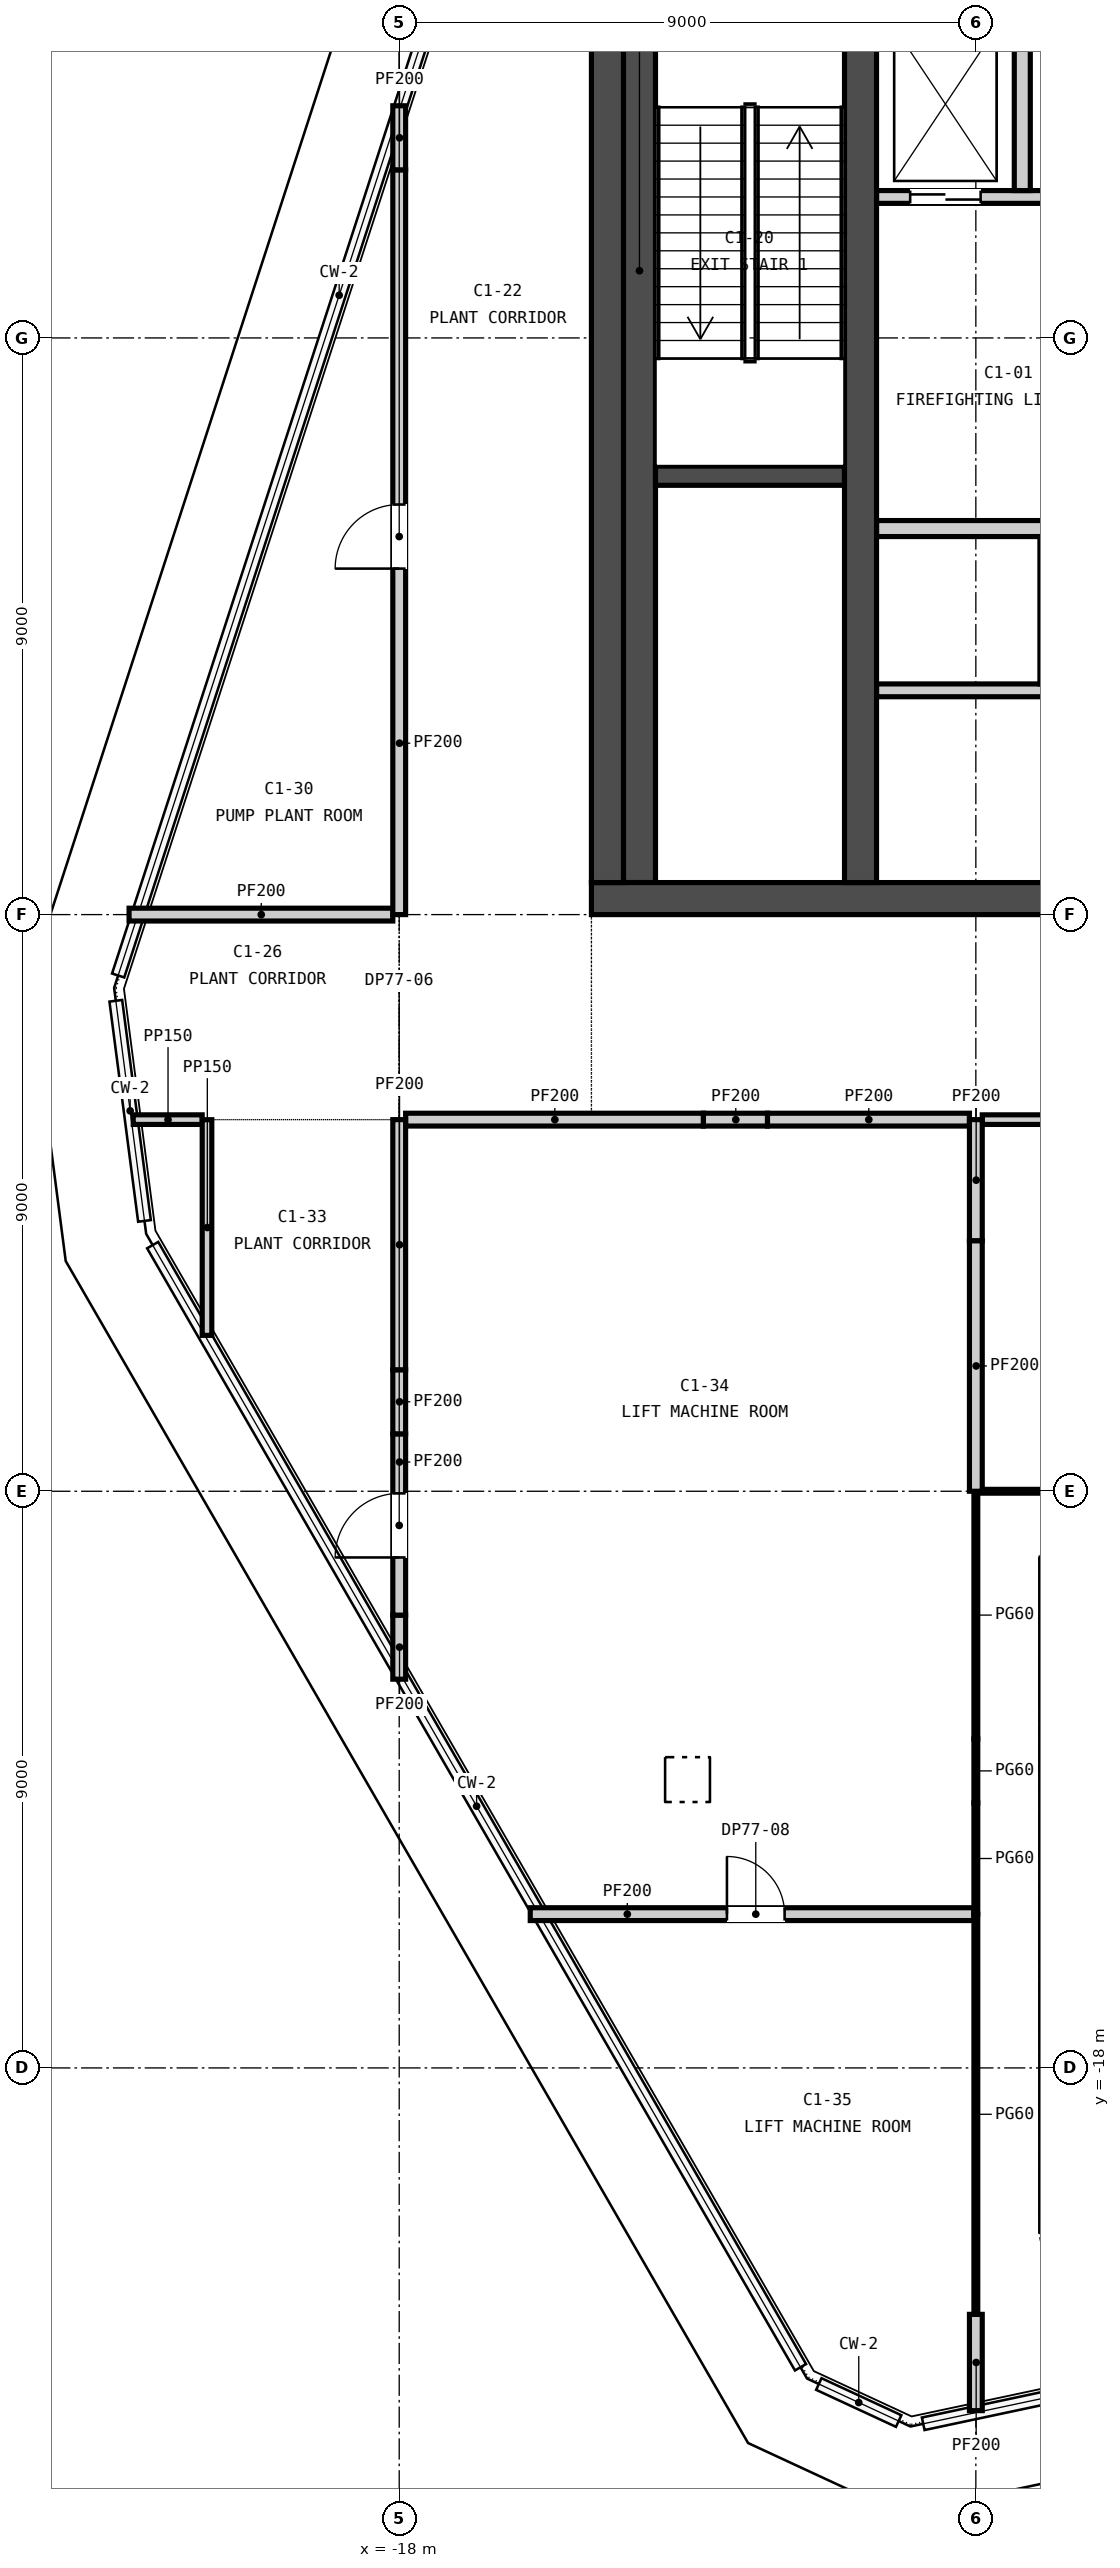
"""IFC4 building model, lengths in metres.
Left out: names, types, materials, properties, quantities, classifications, styles, units other than length and angle.
Written with IfcOpenShell. Run it as: python <this file> out.ifc"""

import sys

from ifc_helpers import new_model, si_unit, direction, frame, frame_2d, origin, place, context, subcontext, project, spatial, rectangle, extrude, element, fill, save


model = new_model("IFC4")
c1 = context("Model", 3, precision=1e-05, world=origin(), true_north=direction((0.0, 1.0)))
c2 = subcontext(c1, "Body", "Model", "MODEL_VIEW")
j1 = project(units=[si_unit("LENGTHUNIT", "METRE"), si_unit("PLANEANGLEUNIT", "RADIAN")], contexts=[c1])
p1 = place(None, origin())
s1 = spatial("IfcSite", under=j1, at=p1, CompositionType="ELEMENT")
p2 = place(p1, origin())
s2 = spatial("IfcBuilding", under=s1, at=p2, CompositionType="ELEMENT")
p3 = place(p2, frame((0.0, 0.0, 301.1)))
s3 = spatial("IfcBuildingStorey", under=s2, at=p3, CompositionType="ELEMENT", Elevation=301.1)
p4 = place(p3, frame((-15.0, 0.25, -0.25), z_axis=(0.0, 0.0, 1.0), x_axis=(1.0, 0.0, 0.0)))
e1 = element("IfcWall", 1, at=p4, inside=s3, PredefinedType="SOLIDWALL", context=c2, shape_type="SweptSolid", body=[
    extrude(rectangle(XDim=30.0, YDim=0.5, at=frame_2d((15.0, 0.0))), origin(), (0.0, 0.0, 1.0), 5.0),
])
for number, where, z_axis, x_axis in (
    (2, (-14.75, 0.5, -0.25), (0.0, 0.0, 1.0), (0.0, 1.0, 0.0)),
    (3, (-10.8, 0.5, -0.25), (0.0, 0.0, 1.0), (0.0, 1.0, 0.0)),
):
    element("IfcWall", number, at=place(p3, frame(where, z_axis=z_axis, x_axis=x_axis)), inside=s3, PredefinedType="SOLIDWALL", context=c2, shape_type="SweptSolid", body=[
        extrude(rectangle(XDim=14.0, YDim=0.5, at=frame_2d((7.0, 0.0))), origin(), (0.0, 0.0, 1.0), 5.0),
    ])
p5 = place(p3, frame((-10.55, 3.5, 0.0), z_axis=(0.0, 0.0, 1.0), x_axis=(1.0, 0.0, 0.0)))
e4 = element("IfcWall", 4, at=p5, inside=s3, PredefinedType="PARTITIONING", context=c2, shape_type="SweptSolid", body=[
    extrude(rectangle(XDim=21.1, YDim=0.2, at=frame_2d((10.55, 0.0))), origin(), (0.0, 0.0, 1.0), 4.75),
])
p6 = place(p5, frame((19.9, 0.0, 0.0)))
e5 = element("IfcOpeningElement", 5, at=p6, cuts=e4, PredefinedType="OPENING", context=c2, shape_type="SweptSolid", body=[
    extrude(rectangle(XDim=0.9, YDim=2.1, at=frame_2d((0.45, 1.05))), frame((0.0, 0.11, 0.0), z_axis=(0.0, -1.0, 0.0), x_axis=(1.0, 0.0, 0.0)), (0.0, 0.0, 1.0), 0.22),
])
p7 = place(p3, frame((-10.55, 6.025, 0.0), z_axis=(0.0, 0.0, 1.0), x_axis=(1.0, 0.0, 0.0)))
e6 = element("IfcWall", 6, at=p7, inside=s3, PredefinedType="PARTITIONING", context=c2, shape_type="SweptSolid", body=[
    extrude(rectangle(XDim=21.1, YDim=0.25, at=frame_2d((10.55, 0.0))), origin(), (0.0, 0.0, 1.0), 4.75),
])
p8 = place(p3, frame((-10.55, 11.2, 0.0), z_axis=(0.0, 0.0, 1.0), x_axis=(1.0, 0.0, 0.0)))
e7 = element("IfcWall", 7, at=p8, inside=s3, PredefinedType="PARTITIONING", context=c2, shape_type="SweptSolid", body=[
    extrude(rectangle(XDim=4.8, YDim=0.2, at=frame_2d((2.4, 0.0))), origin(), (0.0, 0.0, 1.0), 4.75),
])
p9 = place(p8, frame((0.525, 0.0, 0.0)))
e8 = element("IfcOpeningElement", 8, at=p9, cuts=e7, PredefinedType="OPENING", context=c2, shape_type="SweptSolid", body=[
    extrude(rectangle(XDim=1.1, YDim=2.1, at=frame_2d((0.55, 1.05))), frame((0.0, 0.11, 0.0), z_axis=(0.0, -1.0, 0.0), x_axis=(1.0, 0.0, 0.0)), (0.0, 0.0, 1.0), 0.22),
])
p10 = place(p8, frame((2.925, 0.0, 0.0)))
e9 = element("IfcOpeningElement", 9, at=p10, cuts=e7, PredefinedType="OPENING", context=c2, shape_type="SweptSolid", body=[
    extrude(rectangle(XDim=1.1, YDim=2.1, at=frame_2d((0.55, 1.05))), frame((0.0, 0.11, 0.0), z_axis=(0.0, -1.0, 0.0), x_axis=(1.0, 0.0, 0.0)), (0.0, 0.0, 1.0), 0.22),
])
p11 = place(p3, frame((-8.275, 11.3, 0.0), z_axis=(0.0, 0.0, 1.0), x_axis=(0.0, 1.0, 0.0)))
e10 = element("IfcWall", 10, at=p11, inside=s3, PredefinedType="PARTITIONING", context=c2, shape_type="SweptSolid", body=[
    extrude(rectangle(XDim=3.2, YDim=0.25, at=frame_2d((1.6, 0.0))), origin(), (0.0, 0.0, 1.0), 4.75),
])
p12 = place(p3, frame((-14.0, 6.85, 0.0), z_axis=(0.0, 0.0, 1.0), x_axis=(1.0, 0.0, 0.0)))
e11 = element("IfcWall", 11, at=p12, inside=s3, PredefinedType="SOLIDWALL", context=c2, shape_type="SweptSolid", body=[
    extrude(rectangle(XDim=2.95, YDim=0.3, at=frame_2d((1.475, 0.0))), origin(), (0.0, 0.0, 1.0), 4.75),
])
p13 = place(p3, frame((-14.25, 0.5, 0.0), z_axis=(0.0, 0.0, 1.0), x_axis=(0.0, 1.0, 0.0)))
e12 = element("IfcWall", 12, at=p13, inside=s3, PredefinedType="SOLIDWALL", context=c2, shape_type="SweptSolid", body=[
    extrude(rectangle(XDim=14.0, YDim=0.5, at=frame_2d((7.0, 0.0))), origin(), (0.0, 0.0, 1.0), 4.75),
])
p14 = place(p3, frame((-15.955, -15.6, 0.0), z_axis=(0.0, 0.0, 1.0), x_axis=(1.0, 0.0, 0.0)))
e13 = element("IfcWall", 13, at=p14, inside=s3, PredefinedType="PARTITIONING", context=c2, shape_type="SweptSolid", body=[
    extrude(rectangle(XDim=6.925, YDim=0.2, at=frame_2d((3.462, 0.0))), origin(), (0.0, 0.0, 1.0), 4.75),
])
p15 = place(p14, frame((3.07, 0.0, 0.0)))
e14 = element("IfcOpeningElement", 14, at=p15, cuts=e13, PredefinedType="OPENING", context=c2, shape_type="SweptSolid", body=[
    extrude(rectangle(XDim=0.9, YDim=2.1, at=frame_2d((0.45, 1.05))), frame((0.0, 0.11, 0.0), z_axis=(0.0, -1.0, 0.0), x_axis=(1.0, 0.0, 0.0)), (0.0, 0.0, 1.0), 0.22),
])
p16 = place(p3, frame((-8.9, -9.0, 0.0), z_axis=(0.0, 0.0, 1.0), x_axis=(1.0, 0.0, 0.0)))
e15 = element("IfcWall", 15, at=p16, inside=s3, PredefinedType="PARTITIONING", context=c2, shape_type="SweptSolid", body=[
    extrude(rectangle(XDim=17.825, YDim=0.06, at=frame_2d((8.913, 0.0))), origin(), (0.0, 0.0, 1.0), 4.75),
])
p17 = place(p3, frame((-22.151, -3.2, 0.0), z_axis=(0.0, 0.0, 1.0), x_axis=(1.0, 0.0, 0.0)))
e16 = element("IfcWall", 16, at=p17, inside=s3, PredefinedType="PARTITIONING", context=c2, shape_type="SweptSolid", body=[
    extrude(rectangle(XDim=1.076, YDim=0.15, at=frame_2d((0.538, 0.0))), origin(), (0.0, 0.0, 1.0), 4.15),
])
p18 = place(p3, frame((-17.9, -3.2, 0.0), z_axis=(0.0, 0.0, 1.0), x_axis=(1.0, 0.0, 0.0)))
e17 = element("IfcWall", 17, at=p18, inside=s3, PredefinedType="PARTITIONING", context=c2, shape_type="SweptSolid", body=[
    extrude(rectangle(XDim=4.648, YDim=0.2, at=frame_2d((2.324, 0.0))), origin(), (0.0, 0.0, 1.0), 4.75),
])
p19 = place(p3, frame((-13.252, -3.2, 0.0), z_axis=(0.0, 0.0, 1.0), x_axis=(1.0, 0.0, 0.0)))
e18 = element("IfcWall", 18, at=p19, inside=s3, PredefinedType="PARTITIONING", context=c2, shape_type="SweptSolid", body=[
    extrude(rectangle(XDim=1.0, YDim=0.2, at=frame_2d((0.5, 0.0))), origin(), (0.0, 0.0, 1.0), 4.0),
])
p20 = place(p3, frame((-12.252, -3.2, 0.0), z_axis=(0.0, 0.0, 1.0), x_axis=(1.0, 0.0, 0.0)))
e19 = element("IfcWall", 19, at=p20, inside=s3, PredefinedType="PARTITIONING", context=c2, shape_type="SweptSolid", body=[
    extrude(rectangle(XDim=3.152, YDim=0.2, at=frame_2d((1.576, 0.0))), origin(), (0.0, 0.0, 1.0), 4.75),
])
p21 = place(p3, frame((-8.9, -3.2, 0.0), z_axis=(0.0, 0.0, 1.0), x_axis=(1.0, 0.0, 0.0)))
e20 = element("IfcWall", 20, at=p21, inside=s3, PredefinedType="PARTITIONING", context=c2, shape_type="SweptSolid", body=[
    extrude(rectangle(XDim=26.825, YDim=0.15, at=frame_2d((13.413, 0.0))), origin(), (0.0, 0.0, 1.0), 4.75),
])
p22 = place(p21, frame((8.4, 0.0, 0.0)))
e21 = element("IfcOpeningElement", 21, at=p22, cuts=e20, PredefinedType="OPENING", context=c2, shape_type="SweptSolid", body=[
    extrude(rectangle(XDim=1.0, YDim=2.1, at=frame_2d((0.5, 1.05))), frame((0.0, 0.085, 0.0), z_axis=(0.0, -1.0, 0.0), x_axis=(1.0, 0.0, 0.0)), (0.0, 0.0, 1.0), 0.17),
])
p23 = place(p3, frame((-22.216, 0.0, 0.0), z_axis=(0.0, 0.0, 1.0), x_axis=(1.0, 0.0, 0.0)))
e22 = element("IfcWall", 22, at=p23, inside=s3, PredefinedType="PARTITIONING", context=c2, shape_type="SweptSolid", body=[
    extrude(rectangle(XDim=4.116, YDim=0.2, at=frame_2d((2.058, 0.0))), origin(), (0.0, 0.0, 1.0), 4.75),
])
p24 = place(p3, frame((-21.0, -6.567, 0.0), z_axis=(0.0, 0.0, 1.0), x_axis=(0.0, 1.0, 0.0)))
e23 = element("IfcWall", 23, at=p24, inside=s3, PredefinedType="PARTITIONING", context=c2, shape_type="SweptSolid", body=[
    extrude(rectangle(XDim=3.366, YDim=0.15, at=frame_2d((1.683, 0.0))), origin(), (0.0, 0.0, 1.0), 4.75),
])
p25 = place(p3, frame((-18.0, -11.933, 0.0), z_axis=(0.0, 0.0, 1.0), x_axis=(0.0, 1.0, 0.0)))
e24 = element("IfcWall", 24, at=p25, inside=s3, PredefinedType="PARTITIONING", context=c2, shape_type="SweptSolid", body=[
    extrude(rectangle(XDim=1.0, YDim=0.2, at=frame_2d((0.5, 0.0))), origin(), (0.0, 0.0, 1.0), 4.134),
])
p26 = place(p3, frame((-18.0, -10.933, 0.0), z_axis=(0.0, 0.0, 1.0), x_axis=(0.0, 1.0, 0.0)))
e25 = element("IfcWall", 25, at=p26, inside=s3, PredefinedType="PARTITIONING", context=c2, shape_type="SweptSolid", body=[
    extrude(rectangle(XDim=2.829, YDim=0.2, at=frame_2d((1.415, 0.0))), origin(), (0.0, 0.0, 1.0), 4.75),
])
p27 = place(p26, frame((0.9, 0.0, 0.0)))
e26 = element("IfcOpeningElement", 26, at=p27, cuts=e25, PredefinedType="OPENING", context=c2, shape_type="SweptSolid", body=[
    extrude(rectangle(XDim=1.0, YDim=2.1, at=frame_2d((0.5, 1.05))), frame((0.0, 0.11, 0.0), z_axis=(0.0, -1.0, 0.0), x_axis=(1.0, 0.0, 0.0)), (0.0, 0.0, 1.0), 0.22),
])
p28 = place(p3, frame((-18.0, -8.104, 0.0), z_axis=(0.0, 0.0, 1.0), x_axis=(0.0, 1.0, 0.0)))
e27 = element("IfcWall", 27, at=p28, inside=s3, PredefinedType="PARTITIONING", context=c2, shape_type="SweptSolid", body=[
    extrude(rectangle(XDim=1.0, YDim=0.2, at=frame_2d((0.5, 0.0))), origin(), (0.0, 0.0, 1.0), 4.0),
])
p29 = place(p3, frame((-18.0, -7.104, 0.0), z_axis=(0.0, 0.0, 1.0), x_axis=(0.0, 1.0, 0.0)))
e28 = element("IfcWall", 28, at=p29, inside=s3, PredefinedType="PARTITIONING", context=c2, shape_type="SweptSolid", body=[
    extrude(rectangle(XDim=3.904, YDim=0.2, at=frame_2d((1.952, 0.0))), origin(), (0.0, 0.0, 1.0), 4.75),
])
p30 = place(p3, frame((-18.0, 0.0, 0.0), z_axis=(0.0, 0.0, 1.0), x_axis=(0.0, 1.0, 0.0)))
e29 = element("IfcWall", 29, at=p30, inside=s3, PredefinedType="PARTITIONING", context=c2, shape_type="SweptSolid", body=[
    extrude(rectangle(XDim=11.624, YDim=0.2, at=frame_2d((5.812, 0.0))), origin(), (0.0, 0.0, 1.0), 4.75),
])
p31 = place(p30, frame((5.4, 0.0, 0.0)))
e30 = element("IfcOpeningElement", 30, at=p31, cuts=e29, PredefinedType="OPENING", context=c2, shape_type="SweptSolid", body=[
    extrude(rectangle(XDim=1.0, YDim=2.1, at=frame_2d((0.5, 1.05))), frame((0.0, 0.11, 0.0), z_axis=(0.0, -1.0, 0.0), x_axis=(1.0, 0.0, 0.0)), (0.0, 0.0, 1.0), 0.22),
])
p32 = place(p3, frame((-18.0, 11.624, 0.0), z_axis=(0.0, 0.0, 1.0), x_axis=(0.0, 1.0, 0.0)))
e31 = element("IfcWall", 31, at=p32, inside=s3, PredefinedType="PARTITIONING", context=c2, shape_type="SweptSolid", body=[
    extrude(rectangle(XDim=1.0, YDim=0.2, at=frame_2d((0.5, 0.0))), origin(), (0.0, 0.0, 1.0), 4.134),
])
p33 = place(p3, frame((-9.0, -23.349, 0.0), z_axis=(0.0, 0.0, 1.0), x_axis=(0.0, 1.0, 0.0)))
e32 = element("IfcWall", 32, at=p33, inside=s3, PredefinedType="PARTITIONING", context=c2, shape_type="SweptSolid", body=[
    extrude(rectangle(XDim=1.503, YDim=0.2, at=frame_2d((0.751, 0.0))), origin(), (0.0, 0.0, 1.0), 4.75),
])
p34 = place(p3, frame((-9.0, -21.846, 0.0), z_axis=(0.0, 0.0, 1.0), x_axis=(0.0, 1.0, 0.0)))
e33 = element("IfcWall", 33, at=p34, inside=s3, PredefinedType="PARTITIONING", context=c2, shape_type="SweptSolid", body=[
    extrude(rectangle(XDim=6.245, YDim=0.06, at=frame_2d((3.123, 0.0))), origin(), (0.0, 0.0, 1.0), 4.75),
])
p35 = place(p3, frame((-9.0, -15.599, 0.0), z_axis=(0.0, 0.0, 1.0), x_axis=(0.0, 1.0, 0.0)))
e34 = element("IfcWall", 34, at=p35, inside=s3, PredefinedType="PARTITIONING", context=c2, shape_type="SweptSolid", body=[
    extrude(rectangle(XDim=1.735, YDim=0.06, at=frame_2d((0.867, 0.0))), origin(), (0.0, 0.0, 1.0), 4.75),
])
p36 = place(p3, frame((-9.0, -13.864, 0.0), z_axis=(0.0, 0.0, 1.0), x_axis=(0.0, 1.0, 0.0)))
e35 = element("IfcWall", 35, at=p36, inside=s3, PredefinedType="PARTITIONING", context=c2, shape_type="SweptSolid", body=[
    extrude(rectangle(XDim=1.0, YDim=0.06, at=frame_2d((0.5, 0.0))), origin(), (0.0, 0.0, 1.0), 4.071),
])
p37 = place(p3, frame((-9.0, -12.864, 0.0), z_axis=(0.0, 0.0, 1.0), x_axis=(0.0, 1.0, 0.0)))
e36 = element("IfcWall", 36, at=p37, inside=s3, PredefinedType="PARTITIONING", context=c2, shape_type="SweptSolid", body=[
    extrude(rectangle(XDim=3.863, YDim=0.06, at=frame_2d((1.932, 0.0))), origin(), (0.0, 0.0, 1.0), 4.75),
])
p38 = place(p3, frame((-9.0, -9.0, 0.0), z_axis=(0.0, 0.0, 1.0), x_axis=(0.0, 1.0, 0.0)))
e37 = element("IfcWall", 37, at=p38, inside=s3, PredefinedType="PARTITIONING", context=c2, shape_type="SweptSolid", body=[
    extrude(rectangle(XDim=3.911, YDim=0.2, at=frame_2d((1.956, 0.0))), origin(), (0.0, 0.0, 1.0), 4.75),
])
p39 = place(p3, frame((-9.0, -5.089, 0.0), z_axis=(0.0, 0.0, 1.0), x_axis=(0.0, 1.0, 0.0)))
e38 = element("IfcWall", 38, at=p39, inside=s3, PredefinedType="PARTITIONING", context=c2, shape_type="SweptSolid", body=[
    extrude(rectangle(XDim=1.889, YDim=0.2, at=frame_2d((0.945, 0.0))), origin(), (0.0, 0.0, 1.0), 4.0),
])
p40 = place(p9, origin())
e39 = element("IfcDoor", 39, at=p40, inside=s3, OperationType="DOUBLE_DOOR_SLIDING", PredefinedType="DOOR", context=c2, shape_type="SweptSolid", body=[
    extrude(rectangle(XDim=1.1, YDim=2.1, at=frame_2d((0.55, 1.05))), frame((0.0, 0.025, 0.0), z_axis=(0.0, -1.0, 0.0), x_axis=(1.0, 0.0, 0.0)), (0.0, 0.0, 1.0), 0.05),
])
fill(e8, e39)
p41 = place(p31, origin())
e40 = element("IfcDoor", 40, at=p41, inside=s3, OperationType="SINGLE_SWING_LEFT", PredefinedType="DOOR", context=c2, shape_type="SweptSolid", body=[
    extrude(rectangle(XDim=1.0, YDim=2.1, at=frame_2d((0.5, 1.05))), frame((0.0, 0.025, 0.0), z_axis=(0.0, -1.0, 0.0), x_axis=(1.0, 0.0, 0.0)), (0.0, 0.0, 1.0), 0.05),
])
fill(e30, e40)
p42 = place(p27, origin())
e41 = element("IfcDoor", 41, at=p42, inside=s3, OperationType="SINGLE_SWING_LEFT", PredefinedType="DOOR", context=c2, shape_type="SweptSolid", body=[
    extrude(rectangle(XDim=1.0, YDim=2.1, at=frame_2d((0.5, 1.05))), frame((0.0, 0.025, 0.0), z_axis=(0.0, -1.0, 0.0), x_axis=(1.0, 0.0, 0.0)), (0.0, 0.0, 1.0), 0.05),
])
fill(e26, e41)
p43 = place(p15, origin())
e42 = element("IfcDoor", 42, at=p43, inside=s3, OperationType="SINGLE_SWING_LEFT", PredefinedType="DOOR", context=c2, shape_type="SweptSolid", body=[
    extrude(rectangle(XDim=0.9, YDim=2.1, at=frame_2d((0.45, 1.05))), frame((0.0, 0.025, 0.0), z_axis=(0.0, -1.0, 0.0), x_axis=(1.0, 0.0, 0.0)), (0.0, 0.0, 1.0), 0.05),
])
fill(e14, e42)
save(model, sys.argv[1])
